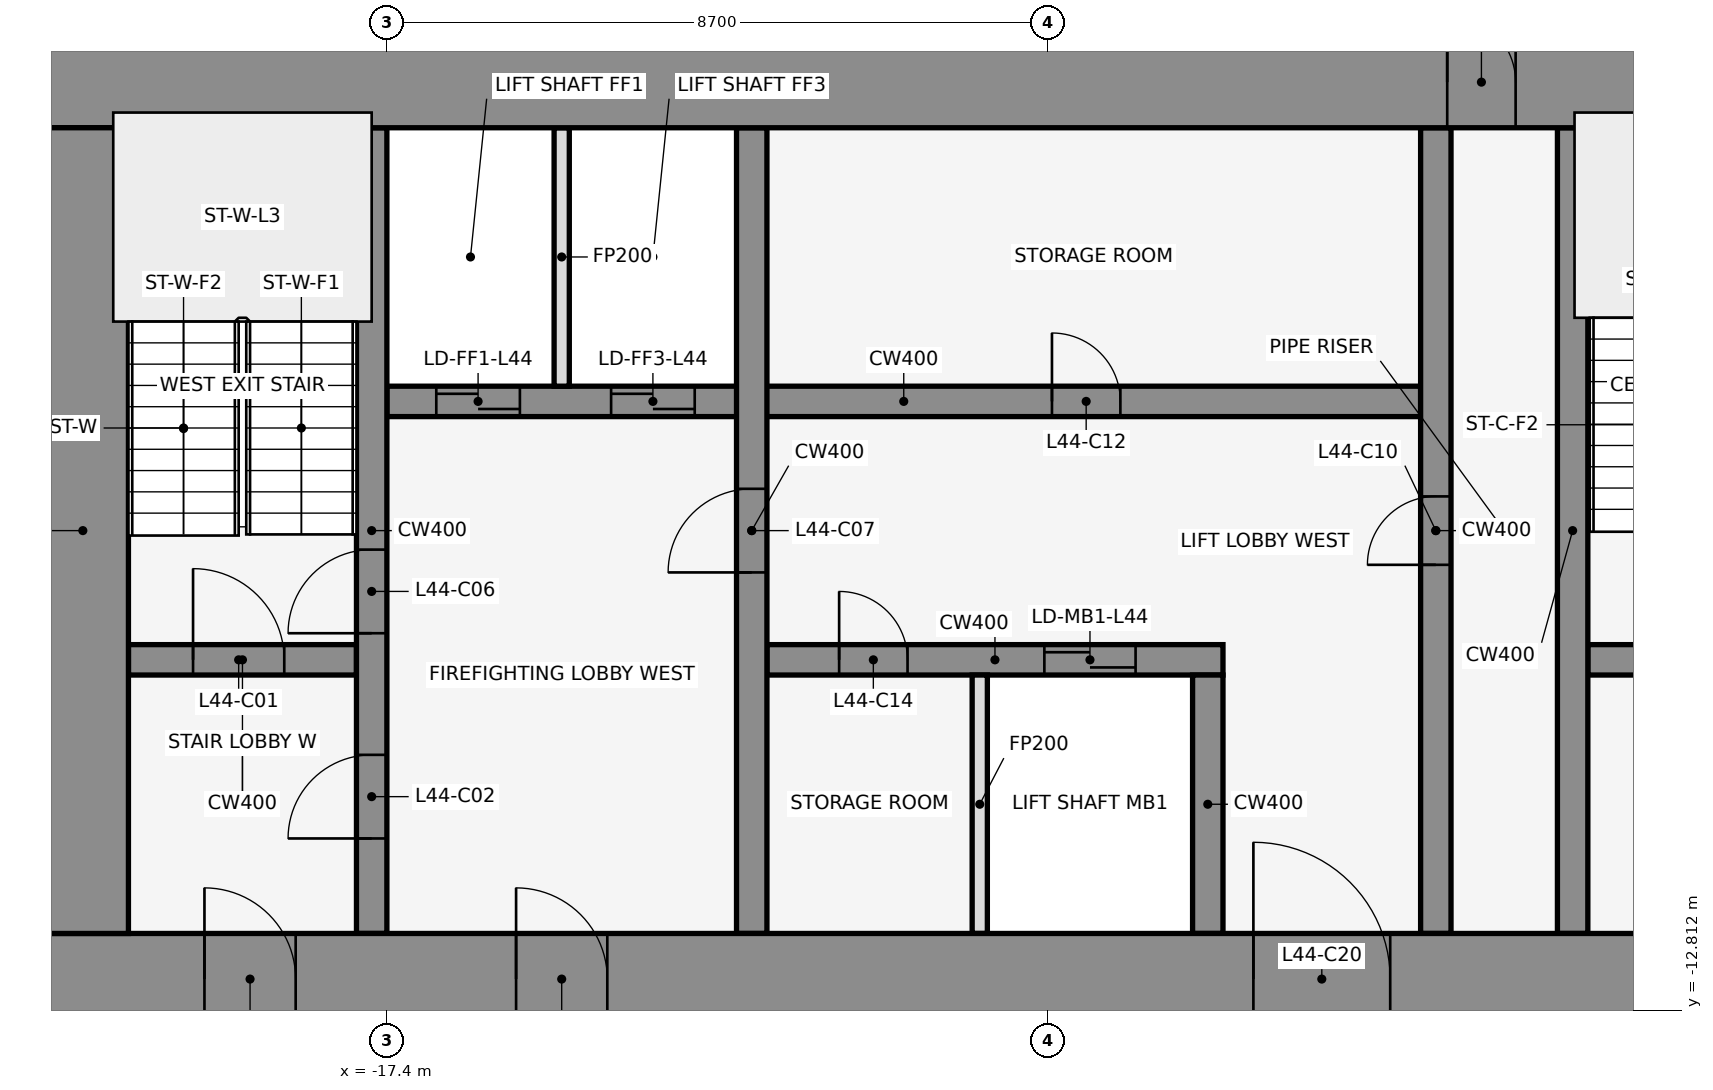
"""IFC4 building model, lengths in metres.
Left out: names, types, materials, properties, quantities, classifications, styles, units other than length and angle.
Written with IfcOpenShell. Run it as: python <this file> out.ifc"""

import sys

from ifc_helpers import new_model, si_unit, direction, frame, frame_2d, origin, place, context, subcontext, project, spatial, rectangle, extrude, element, fill, save


model = new_model("IFC4")
c1 = context("Model", 3, precision=1e-05, world=origin(), true_north=direction((0.0, 1.0)))
c2 = subcontext(c1, "Body", "Model", "MODEL_VIEW")
j1 = project(units=[si_unit("LENGTHUNIT", "METRE"), si_unit("PLANEANGLEUNIT", "RADIAN")], contexts=[c1])
p1 = place(None, origin())
s1 = spatial("IfcSite", under=j1, at=p1, CompositionType="ELEMENT")
p2 = place(p1, origin())
s2 = spatial("IfcBuilding", under=s1, at=p2, CompositionType="ELEMENT")
p3 = place(p2, frame((0.0, 0.0, 199.1)))
s3 = spatial("IfcBuildingStorey", under=s2, at=p3, CompositionType="ELEMENT", Elevation=199.1)
for number, where, z_axis, x_axis in (
    (1, (-0.068, -0.105, 0.0), (0.0, 0.0, 1.0), (-0.84, 0.543, 0.0)),
    (2, (-14.599, 1.08, 0.0), (0.0, 0.0, 1.0), (-0.84, -0.543, 0.0)),
):
    element("IfcWall", number, at=place(p3, frame(where, z_axis=z_axis, x_axis=x_axis)), inside=s3, PredefinedType="STANDARD", context=c2, shape_type="SweptSolid", body=[
        extrude(rectangle(XDim=2.183, YDim=0.25, at=frame_2d((1.091, 0.0))), origin(), (0.0, 0.0, 1.0), 3.95),
    ])
p4 = place(p3, frame((-20.8, -8.2, 0.0), z_axis=(0.0, 0.0, 1.0), x_axis=(1.0, 0.0, 0.0)))
e3 = element("IfcWall", 3, at=p4, inside=s3, PredefinedType="SHEAR", context=c2, shape_type="SweptSolid", body=[
    extrude(rectangle(XDim=3.0, YDim=0.4, at=frame_2d((1.5, 0.0))), origin(), (0.0, 0.0, 1.0), 4.1),
])
p5 = place(p4, frame((0.85, 0.0, 0.0)))
e4 = element("IfcOpeningElement", 4, at=p5, cuts=e3, PredefinedType="OPENING", context=c2, shape_type="SweptSolid", body=[
    extrude(rectangle(XDim=1.2, YDim=2.1, at=frame_2d((0.6, 1.05))), frame((0.0, 0.212, 0.0), z_axis=(0.0, -1.0, 0.0), x_axis=(1.0, 0.0, 0.0)), (0.0, 0.0, 1.0), 0.424),
])
p6 = place(p3, frame((-12.4, -8.2, 0.0), z_axis=(0.0, 0.0, 1.0), x_axis=(1.0, 0.0, 0.0)))
e5 = element("IfcWall", 5, at=p6, inside=s3, PredefinedType="SHEAR", context=c2, shape_type="SweptSolid", body=[
    extrude(rectangle(XDim=6.0, YDim=0.4, at=frame_2d((3.0, 0.0))), origin(), (0.0, 0.0, 1.0), 4.1),
])
p7 = place(p6, frame((3.65, 0.0, 0.0)))
e6 = element("IfcOpeningElement", 6, at=p7, cuts=e5, PredefinedType="OPENING", context=c2, shape_type="SweptSolid", body=[
    extrude(rectangle(XDim=1.2, YDim=2.1, at=frame_2d((0.6, 1.05))), frame((0.0, 0.212, 0.0), z_axis=(0.0, -1.0, 0.0), x_axis=(1.0, 0.0, 0.0)), (0.0, 0.0, 1.0), 0.424),
])
p8 = place(p6, frame((0.95, 0.0, 0.0)))
e7 = element("IfcOpeningElement", 7, at=p8, cuts=e5, PredefinedType="OPENING", context=c2, shape_type="SweptSolid", body=[
    extrude(rectangle(XDim=0.9, YDim=2.1, at=frame_2d((0.45, 1.05))), frame((0.0, 0.212, 0.0), z_axis=(0.0, -1.0, 0.0), x_axis=(1.0, 0.0, 0.0)), (0.0, 0.0, 1.0), 0.424),
])
p9 = place(p3, frame((-1.6, -8.2, 0.0), z_axis=(0.0, 0.0, 1.0), x_axis=(1.0, 0.0, 0.0)))
e8 = element("IfcWall", 8, at=p9, inside=s3, PredefinedType="SHEAR", context=c2, shape_type="SweptSolid", body=[
    extrude(rectangle(XDim=3.2, YDim=0.4, at=frame_2d((1.6, 0.0))), origin(), (0.0, 0.0, 1.0), 4.1),
])
p10 = place(p9, frame((1.05, 0.0, 0.0)))
e9 = element("IfcOpeningElement", 9, at=p10, cuts=e8, PredefinedType="OPENING", context=c2, shape_type="SweptSolid", body=[
    extrude(rectangle(XDim=1.2, YDim=2.1, at=frame_2d((0.6, 1.05))), frame((0.0, 0.212, 0.0), z_axis=(0.0, -1.0, 0.0), x_axis=(1.0, 0.0, 0.0)), (0.0, 0.0, 1.0), 0.424),
])
p11 = place(p3, frame((-17.4, -4.8, 0.0), z_axis=(0.0, 0.0, 1.0), x_axis=(1.0, 0.0, 0.0)))
e10 = element("IfcWall", 10, at=p11, inside=s3, PredefinedType="SHEAR", context=c2, shape_type="SweptSolid", body=[
    extrude(rectangle(XDim=13.6, YDim=0.4, at=frame_2d((6.8, 0.0))), origin(), (0.0, 0.0, 1.0), 4.1),
])
p12 = place(p11, frame((0.65, 0.0, 0.0)))
e11 = element("IfcOpeningElement", 11, at=p12, cuts=e10, PredefinedType="OPENING", context=c2, shape_type="SweptSolid", body=[
    extrude(rectangle(XDim=1.1, YDim=2.1, at=frame_2d((0.55, 1.05))), frame((0.0, 0.212, 0.0), z_axis=(0.0, -1.0, 0.0), x_axis=(1.0, 0.0, 0.0)), (0.0, 0.0, 1.0), 0.424),
])
p13 = place(p11, frame((2.95, 0.0, 0.0)))
e12 = element("IfcOpeningElement", 12, at=p13, cuts=e10, PredefinedType="OPENING", context=c2, shape_type="SweptSolid", body=[
    extrude(rectangle(XDim=1.1, YDim=2.1, at=frame_2d((0.55, 1.05))), frame((0.0, 0.212, 0.0), z_axis=(0.0, -1.0, 0.0), x_axis=(1.0, 0.0, 0.0)), (0.0, 0.0, 1.0), 0.424),
])
p14 = place(p11, frame((8.75, 0.0, 0.0)))
e13 = element("IfcOpeningElement", 13, at=p14, cuts=e10, PredefinedType="OPENING", context=c2, shape_type="SweptSolid", body=[
    extrude(rectangle(XDim=0.9, YDim=2.1, at=frame_2d((0.45, 1.05))), frame((0.0, 0.212, 0.0), z_axis=(0.0, -1.0, 0.0), x_axis=(1.0, 0.0, 0.0)), (0.0, 0.0, 1.0), 0.424),
])
p15 = place(p3, frame((-17.6, -11.8, 0.0), z_axis=(0.0, 0.0, 1.0), x_axis=(0.0, 1.0, 0.0)))
e14 = element("IfcWall", 14, at=p15, inside=s3, PredefinedType="SHEAR", context=c2, shape_type="SweptSolid", body=[
    extrude(rectangle(XDim=10.6, YDim=0.4, at=frame_2d((5.3, 0.0))), origin(), (0.0, 0.0, 1.0), 4.1),
])
p16 = place(p15, frame((1.25, 0.0, 0.0)))
e15 = element("IfcOpeningElement", 15, at=p16, cuts=e14, PredefinedType="OPENING", context=c2, shape_type="SweptSolid", body=[
    extrude(rectangle(XDim=1.1, YDim=2.1, at=frame_2d((0.55, 1.05))), frame((0.0, 0.212, 0.0), z_axis=(0.0, -1.0, 0.0), x_axis=(1.0, 0.0, 0.0)), (0.0, 0.0, 1.0), 0.424),
])
p17 = place(p15, frame((3.95, 0.0, 0.0)))
e16 = element("IfcOpeningElement", 16, at=p17, cuts=e14, PredefinedType="OPENING", context=c2, shape_type="SweptSolid", body=[
    extrude(rectangle(XDim=1.1, YDim=2.1, at=frame_2d((0.55, 1.05))), frame((0.0, 0.212, 0.0), z_axis=(0.0, -1.0, 0.0), x_axis=(1.0, 0.0, 0.0)), (0.0, 0.0, 1.0), 0.424),
])
p18 = place(p3, frame((-15.1, -4.6, 0.0), z_axis=(0.0, 0.0, 1.0), x_axis=(0.0, 1.0, 0.0)))
e17 = element("IfcWall", 17, at=p18, inside=s3, PredefinedType="PARTITIONING", context=c2, shape_type="SweptSolid", body=[
    extrude(rectangle(XDim=3.4, YDim=0.2, at=frame_2d((1.7, 0.0))), origin(), (0.0, 0.0, 1.0), 2.84),
])
p19 = place(p3, frame((-12.6, -11.8, 0.0), z_axis=(0.0, 0.0, 1.0), x_axis=(0.0, 1.0, 0.0)))
e18 = element("IfcWall", 18, at=p19, inside=s3, PredefinedType="SHEAR", context=c2, shape_type="SweptSolid", body=[
    extrude(rectangle(XDim=10.6, YDim=0.4, at=frame_2d((5.3, 0.0))), origin(), (0.0, 0.0, 1.0), 4.1),
])
p20 = place(p19, frame((4.75, 0.0, 0.0)))
e19 = element("IfcOpeningElement", 19, at=p20, cuts=e18, PredefinedType="OPENING", context=c2, shape_type="SweptSolid", body=[
    extrude(rectangle(XDim=1.1, YDim=2.1, at=frame_2d((0.55, 1.05))), frame((0.0, 0.212, 0.0), z_axis=(0.0, -1.0, 0.0), x_axis=(1.0, 0.0, 0.0)), (0.0, 0.0, 1.0), 0.424),
])
p21 = place(p3, frame((-9.6, -11.8, 0.0), z_axis=(0.0, 0.0, 1.0), x_axis=(0.0, 1.0, 0.0)))
e20 = element("IfcWall", 20, at=p21, inside=s3, PredefinedType="PARTITIONING", context=c2, shape_type="SweptSolid", body=[
    extrude(rectangle(XDim=3.4, YDim=0.2, at=frame_2d((1.7, 0.0))), origin(), (0.0, 0.0, 1.0), 2.84),
])
p22 = place(p3, frame((-6.6, -11.8, 0.0), z_axis=(0.0, 0.0, 1.0), x_axis=(0.0, 1.0, 0.0)))
e21 = element("IfcWall", 21, at=p22, inside=s3, PredefinedType="SHEAR", context=c2, shape_type="SweptSolid", body=[
    extrude(rectangle(XDim=3.4, YDim=0.4, at=frame_2d((1.7, 0.0))), origin(), (0.0, 0.0, 1.0), 4.1),
])
p23 = place(p3, frame((-3.6, -11.8, 0.0), z_axis=(0.0, 0.0, 1.0), x_axis=(0.0, 1.0, 0.0)))
e22 = element("IfcWall", 22, at=p23, inside=s3, PredefinedType="SHEAR", context=c2, shape_type="SweptSolid", body=[
    extrude(rectangle(XDim=10.6, YDim=0.4, at=frame_2d((5.3, 0.0))), origin(), (0.0, 0.0, 1.0), 4.1),
])
p24 = place(p23, frame((4.85, 0.0, 0.0)))
e23 = element("IfcOpeningElement", 23, at=p24, cuts=e22, PredefinedType="OPENING", context=c2, shape_type="SweptSolid", body=[
    extrude(rectangle(XDim=0.9, YDim=2.1, at=frame_2d((0.45, 1.05))), frame((0.0, 0.212, 0.0), z_axis=(0.0, -1.0, 0.0), x_axis=(1.0, 0.0, 0.0)), (0.0, 0.0, 1.0), 0.424),
])
p25 = place(p3, frame((-1.8, -11.8, 0.0), z_axis=(0.0, 0.0, 1.0), x_axis=(0.0, 1.0, 0.0)))
e24 = element("IfcWall", 24, at=p25, inside=s3, PredefinedType="SHEAR", context=c2, shape_type="SweptSolid", body=[
    extrude(rectangle(XDim=10.6, YDim=0.4, at=frame_2d((5.3, 0.0))), origin(), (0.0, 0.0, 1.0), 4.1),
])
p26 = place(p3, frame((-22.0, -0.6, 0.0), z_axis=(0.0, 0.0, 1.0), x_axis=(1.0, 0.0, 0.0)))
e25 = element("IfcWall", 25, at=p26, inside=s3, PredefinedType="SHEAR", context=c2, shape_type="SweptSolid", body=[
    extrude(rectangle(XDim=44.0, YDim=1.2, at=frame_2d((22.0, 0.0))), origin(), (0.0, 0.0, 1.0), 4.1),
])
p27 = place(p26, frame((18.55, 0.0, 0.0)))
e26 = element("IfcOpeningElement", 26, at=p27, cuts=e25, PredefinedType="OPENING", context=c2, shape_type="SweptSolid", body=[
    extrude(rectangle(XDim=0.9, YDim=2.1, at=frame_2d((0.45, 1.05))), frame((0.0, 0.612, 0.0), z_axis=(0.0, -1.0, 0.0), x_axis=(1.0, 0.0, 0.0)), (0.0, 0.0, 1.0), 1.224),
])
p28 = place(p26, frame((24.55, 0.0, 0.0)))
e27 = element("IfcOpeningElement", 27, at=p28, cuts=e25, PredefinedType="OPENING", context=c2, shape_type="SweptSolid", body=[
    extrude(rectangle(XDim=0.9, YDim=2.1, at=frame_2d((0.45, 1.05))), frame((0.0, 0.612, 0.0), z_axis=(0.0, -1.0, 0.0), x_axis=(1.0, 0.0, 0.0)), (0.0, 0.0, 1.0), 1.224),
])
p29 = place(p3, frame((-22.0, -12.4, 0.0), z_axis=(0.0, 0.0, 1.0), x_axis=(1.0, 0.0, 0.0)))
e28 = element("IfcWall", 28, at=p29, inside=s3, PredefinedType="SHEAR", context=c2, shape_type="SweptSolid", body=[
    extrude(rectangle(XDim=44.0, YDim=1.2, at=frame_2d((22.0, 0.0))), origin(), (0.0, 0.0, 1.0), 4.1),
])
p30 = place(p29, frame((2.2, 0.0, 0.0)))
e29 = element("IfcOpeningElement", 29, at=p30, cuts=e28, PredefinedType="OPENING", context=c2, shape_type="SweptSolid", body=[
    extrude(rectangle(XDim=1.2, YDim=2.1, at=frame_2d((0.6, 1.05))), frame((0.0, 0.612, 0.0), z_axis=(0.0, -1.0, 0.0), x_axis=(1.0, 0.0, 0.0)), (0.0, 0.0, 1.0), 1.224),
])
p31 = place(p29, frame((21.4, 0.0, 0.0)))
e30 = element("IfcOpeningElement", 30, at=p31, cuts=e28, PredefinedType="OPENING", context=c2, shape_type="SweptSolid", body=[
    extrude(rectangle(XDim=1.2, YDim=2.1, at=frame_2d((0.6, 1.05))), frame((0.0, 0.612, 0.0), z_axis=(0.0, -1.0, 0.0), x_axis=(1.0, 0.0, 0.0)), (0.0, 0.0, 1.0), 1.224),
])
p32 = place(p29, frame((40.6, 0.0, 0.0)))
e31 = element("IfcOpeningElement", 31, at=p32, cuts=e28, PredefinedType="OPENING", context=c2, shape_type="SweptSolid", body=[
    extrude(rectangle(XDim=1.2, YDim=2.1, at=frame_2d((0.6, 1.05))), frame((0.0, 0.612, 0.0), z_axis=(0.0, -1.0, 0.0), x_axis=(1.0, 0.0, 0.0)), (0.0, 0.0, 1.0), 1.224),
])
p33 = place(p29, frame((16.0, 0.0, 0.0)))
e32 = element("IfcOpeningElement", 32, at=p33, cuts=e28, PredefinedType="OPENING", context=c2, shape_type="SweptSolid", body=[
    extrude(rectangle(XDim=1.8, YDim=2.1, at=frame_2d((0.9, 1.05))), frame((0.0, 0.612, 0.0), z_axis=(0.0, -1.0, 0.0), x_axis=(1.0, 0.0, 0.0)), (0.0, 0.0, 1.0), 1.224),
])
p34 = place(p29, frame((6.3, 0.0, 0.0)))
e33 = element("IfcOpeningElement", 33, at=p34, cuts=e28, PredefinedType="OPENING", context=c2, shape_type="SweptSolid", body=[
    extrude(rectangle(XDim=1.2, YDim=2.1, at=frame_2d((0.6, 1.05))), frame((0.0, 0.612, 0.0), z_axis=(0.0, -1.0, 0.0), x_axis=(1.0, 0.0, 0.0)), (0.0, 0.0, 1.0), 1.224),
])
p35 = place(p29, frame((26.2, 0.0, 0.0)))
e34 = element("IfcOpeningElement", 34, at=p35, cuts=e28, PredefinedType="OPENING", context=c2, shape_type="SweptSolid", body=[
    extrude(rectangle(XDim=1.8, YDim=2.1, at=frame_2d((0.9, 1.05))), frame((0.0, 0.612, 0.0), z_axis=(0.0, -1.0, 0.0), x_axis=(1.0, 0.0, 0.0)), (0.0, 0.0, 1.0), 1.224),
])
p36 = place(p29, frame((36.5, 0.0, 0.0)))
e35 = element("IfcOpeningElement", 35, at=p36, cuts=e28, PredefinedType="OPENING", context=c2, shape_type="SweptSolid", body=[
    extrude(rectangle(XDim=1.2, YDim=2.1, at=frame_2d((0.6, 1.05))), frame((0.0, 0.612, 0.0), z_axis=(0.0, -1.0, 0.0), x_axis=(1.0, 0.0, 0.0)), (0.0, 0.0, 1.0), 1.224),
])
p37 = place(p3, frame((-21.4, -11.8, 0.0), z_axis=(0.0, 0.0, 1.0), x_axis=(0.0, 1.0, 0.0)))
e36 = element("IfcWall", 36, at=p37, inside=s3, PredefinedType="SHEAR", context=c2, shape_type="SweptSolid", body=[
    extrude(rectangle(XDim=10.6, YDim=1.2, at=frame_2d((5.3, 0.0))), origin(), (0.0, 0.0, 1.0), 4.1),
])
p38 = place(p5, origin())
e37 = element("IfcDoor", 37, at=p38, inside=s3, OperationType="SINGLE_SWING_LEFT", PredefinedType="DOOR", context=c2, shape_type="SweptSolid", body=[
    extrude(rectangle(XDim=1.2, YDim=2.1, at=frame_2d((0.6, 1.05))), frame((0.0, 0.025, 0.0), z_axis=(0.0, -1.0, 0.0), x_axis=(1.0, 0.0, 0.0)), (0.0, 0.0, 1.0), 0.05),
])
fill(e4, e37)
p39 = place(p16, frame((1.1, 0.0, 0.0), z_axis=(0.0, 0.0, 1.0), x_axis=(-1.0, 0.0, 0.0)))
e38 = element("IfcDoor", 38, at=p39, inside=s3, OperationType="SINGLE_SWING_LEFT", PredefinedType="DOOR", context=c2, shape_type="SweptSolid", body=[
    extrude(rectangle(XDim=1.1, YDim=2.1, at=frame_2d((0.55, 1.05))), frame((0.0, 0.025, 0.0), z_axis=(0.0, -1.0, 0.0), x_axis=(1.0, 0.0, 0.0)), (0.0, 0.0, 1.0), 0.05),
])
fill(e15, e38)
p40 = place(p12, origin())
e39 = element("IfcDoor", 39, at=p40, inside=s3, OperationType="DOUBLE_DOOR_SLIDING", PredefinedType="DOOR", context=c2, shape_type="SweptSolid", body=[
    extrude(rectangle(XDim=1.1, YDim=2.1, at=frame_2d((0.55, 1.05))), frame((0.0, 0.025, 0.0), z_axis=(0.0, -1.0, 0.0), x_axis=(1.0, 0.0, 0.0)), (0.0, 0.0, 1.0), 0.05),
])
fill(e11, e39)
p41 = place(p13, origin())
e40 = element("IfcDoor", 40, at=p41, inside=s3, OperationType="DOUBLE_DOOR_SLIDING", PredefinedType="DOOR", context=c2, shape_type="SweptSolid", body=[
    extrude(rectangle(XDim=1.1, YDim=2.1, at=frame_2d((0.55, 1.05))), frame((0.0, 0.025, 0.0), z_axis=(0.0, -1.0, 0.0), x_axis=(1.0, 0.0, 0.0)), (0.0, 0.0, 1.0), 0.05),
])
fill(e12, e40)
p42 = place(p7, origin())
e41 = element("IfcDoor", 41, at=p42, inside=s3, OperationType="DOUBLE_DOOR_SLIDING", PredefinedType="DOOR", context=c2, shape_type="SweptSolid", body=[
    extrude(rectangle(XDim=1.2, YDim=2.1, at=frame_2d((0.6, 1.05))), frame((0.0, 0.025, 0.0), z_axis=(0.0, -1.0, 0.0), x_axis=(1.0, 0.0, 0.0)), (0.0, 0.0, 1.0), 0.05),
])
fill(e6, e41)
p43 = place(p17, frame((1.1, 0.0, 0.0), z_axis=(0.0, 0.0, 1.0), x_axis=(-1.0, 0.0, 0.0)))
e42 = element("IfcDoor", 42, at=p43, inside=s3, OperationType="SINGLE_SWING_LEFT", PredefinedType="DOOR", context=c2, shape_type="SweptSolid", body=[
    extrude(rectangle(XDim=1.1, YDim=2.1, at=frame_2d((0.55, 1.05))), frame((0.0, 0.025, 0.0), z_axis=(0.0, -1.0, 0.0), x_axis=(1.0, 0.0, 0.0)), (0.0, 0.0, 1.0), 0.05),
])
fill(e16, e42)
p44 = place(p20, origin())
e43 = element("IfcDoor", 43, at=p44, inside=s3, OperationType="SINGLE_SWING_LEFT", PredefinedType="DOOR", context=c2, shape_type="SweptSolid", body=[
    extrude(rectangle(XDim=1.1, YDim=2.1, at=frame_2d((0.55, 1.05))), frame((0.0, 0.025, 0.0), z_axis=(0.0, -1.0, 0.0), x_axis=(1.0, 0.0, 0.0)), (0.0, 0.0, 1.0), 0.05),
])
fill(e19, e43)
p45 = place(p24, frame((0.9, 0.0, 0.0), z_axis=(0.0, 0.0, 1.0), x_axis=(-1.0, 0.0, 0.0)))
e44 = element("IfcDoor", 44, at=p45, inside=s3, OperationType="SINGLE_SWING_LEFT", PredefinedType="DOOR", context=c2, shape_type="SweptSolid", body=[
    extrude(rectangle(XDim=0.9, YDim=2.1, at=frame_2d((0.45, 1.05))), frame((0.0, 0.025, 0.0), z_axis=(0.0, -1.0, 0.0), x_axis=(1.0, 0.0, 0.0)), (0.0, 0.0, 1.0), 0.05),
])
fill(e23, e44)
p46 = place(p14, origin())
e45 = element("IfcDoor", 45, at=p46, inside=s3, OperationType="SINGLE_SWING_RIGHT", PredefinedType="DOOR", context=c2, shape_type="SweptSolid", body=[
    extrude(rectangle(XDim=0.9, YDim=2.1, at=frame_2d((0.45, 1.05))), frame((0.0, 0.025, 0.0), z_axis=(0.0, -1.0, 0.0), x_axis=(1.0, 0.0, 0.0)), (0.0, 0.0, 1.0), 0.05),
])
fill(e13, e45)
p47 = place(p8, frame((0.9, 0.0, 0.0), z_axis=(0.0, 0.0, 1.0), x_axis=(-1.0, 0.0, 0.0)))
e46 = element("IfcDoor", 46, at=p47, inside=s3, OperationType="SINGLE_SWING_LEFT", PredefinedType="DOOR", context=c2, shape_type="SweptSolid", body=[
    extrude(rectangle(XDim=0.9, YDim=2.1, at=frame_2d((0.45, 1.05))), frame((0.0, 0.025, 0.0), z_axis=(0.0, -1.0, 0.0), x_axis=(1.0, 0.0, 0.0)), (0.0, 0.0, 1.0), 0.05),
])
fill(e7, e46)
p48 = place(p27, origin())
e47 = element("IfcDoor", 47, at=p48, inside=s3, OperationType="SINGLE_SWING_LEFT", PredefinedType="DOOR", context=c2, shape_type="SweptSolid", body=[
    extrude(rectangle(XDim=0.9, YDim=2.1, at=frame_2d((0.45, 1.05))), frame((0.0, 0.025, 0.0), z_axis=(0.0, -1.0, 0.0), x_axis=(1.0, 0.0, 0.0)), (0.0, 0.0, 1.0), 0.05),
])
fill(e26, e47)
p49 = place(p30, frame((1.2, 0.0, 0.0), z_axis=(0.0, 0.0, 1.0), x_axis=(-1.0, 0.0, 0.0)))
e48 = element("IfcDoor", 48, at=p49, inside=s3, OperationType="SINGLE_SWING_RIGHT", PredefinedType="DOOR", context=c2, shape_type="SweptSolid", body=[
    extrude(rectangle(XDim=1.2, YDim=2.1, at=frame_2d((0.6, 1.05))), frame((0.0, 0.025, 0.0), z_axis=(0.0, -1.0, 0.0), x_axis=(1.0, 0.0, 0.0)), (0.0, 0.0, 1.0), 0.05),
])
fill(e29, e48)
p50 = place(p33, origin())
e49 = element("IfcDoor", 49, at=p50, inside=s3, OperationType="SINGLE_SWING_LEFT", PredefinedType="DOOR", context=c2, shape_type="SweptSolid", body=[
    extrude(rectangle(XDim=1.8, YDim=2.1, at=frame_2d((0.9, 1.05))), frame((0.0, 0.025, 0.0), z_axis=(0.0, -1.0, 0.0), x_axis=(1.0, 0.0, 0.0)), (0.0, 0.0, 1.0), 0.05),
])
fill(e32, e49)
p51 = place(p34, frame((1.2, 0.0, 0.0), z_axis=(0.0, 0.0, 1.0), x_axis=(-1.0, 0.0, 0.0)))
e50 = element("IfcDoor", 50, at=p51, inside=s3, OperationType="SINGLE_SWING_RIGHT", PredefinedType="DOOR", context=c2, shape_type="SweptSolid", body=[
    extrude(rectangle(XDim=1.2, YDim=2.1, at=frame_2d((0.6, 1.05))), frame((0.0, 0.025, 0.0), z_axis=(0.0, -1.0, 0.0), x_axis=(1.0, 0.0, 0.0)), (0.0, 0.0, 1.0), 0.05),
])
fill(e33, e50)
save(model, sys.argv[1])
